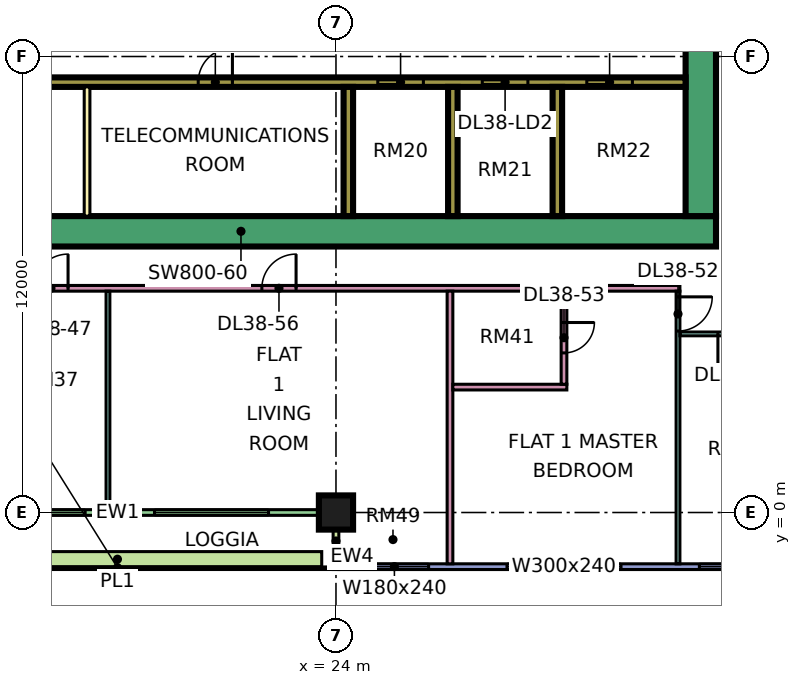
"""IFC4 building model, lengths in metres.
Left out: names, types, materials, properties, quantities, classifications, styles, units other than length and angle.
Written with IfcOpenShell. Run it as: python <this file> out.ifc"""

import sys

from ifc_helpers import new_model, si_unit, direction, frame, frame_2d, origin, origin_2d, place, context, subcontext, project, spatial, rectangle, extrude, element, fill, save


model = new_model("IFC4")
c1 = context("Model", 3, precision=1e-05, world=origin(), true_north=direction((0.0, 1.0)))
c2 = subcontext(c1, "Body", "Model", "MODEL_VIEW")
j1 = project(units=[si_unit("LENGTHUNIT", "METRE"), si_unit("PLANEANGLEUNIT", "RADIAN")], contexts=[c1])
p1 = place(None, origin())
s1 = spatial("IfcSite", under=j1, at=p1, CompositionType="ELEMENT")
p2 = place(p1, origin())
s2 = spatial("IfcBuilding", under=s1, at=p2, CompositionType="ELEMENT")
p3 = place(p2, frame((0.0, 0.0, 168.65)))
s3 = spatial("IfcBuildingStorey", under=s2, at=p3, CompositionType="ELEMENT", Elevation=168.65)
p4 = place(p3, frame((24.0, 0.0, 0.0), z_axis=(0.0, 0.0, 1.0), x_axis=(1.0, 0.0, 0.0)))
e1 = element("IfcColumn", 1, at=p4, inside=s3, PredefinedType="COLUMN", context=c2, shape_type="SweptSolid", body=[
    extrude(rectangle(XDim=0.9, YDim=0.9, at=origin_2d()), origin(), (0.0, 0.0, 1.0), 3.75),
])
p5 = place(p3, frame((9.0, 7.4, 0.0), z_axis=(0.0, 0.0, 1.0), x_axis=(1.0, 0.0, 0.0)))
e2 = element("IfcWall", 2, at=p5, inside=s3, PredefinedType="SHEAR", context=c2, shape_type="SweptSolid", body=[
    extrude(rectangle(XDim=25.0, YDim=0.8, at=frame_2d((12.5, 0.0))), origin(), (0.0, 0.0, 1.0), 3.75),
])
p6 = place(p3, frame((33.6, 7.8, 0.0), z_axis=(0.0, 0.0, 1.0), x_axis=(0.0, 1.0, 0.0)))
e3 = element("IfcWall", 3, at=p6, inside=s3, PredefinedType="SHEAR", context=c2, shape_type="SweptSolid", body=[
    extrude(rectangle(XDim=11.4, YDim=0.8, at=frame_2d((5.7, 0.0))), origin(), (0.0, 0.0, 1.0), 3.75),
])
p7 = place(p6, frame((5.4, 0.0, 0.0)))
e4 = element("IfcOpeningElement", 4, at=p7, cuts=e3, PredefinedType="OPENING", context=c2, shape_type="SweptSolid", body=[
    extrude(rectangle(XDim=1.8, YDim=2.4, at=frame_2d((0.9, 1.2))), frame((0.0, 0.41, 0.0), z_axis=(0.0, -1.0, 0.0), x_axis=(1.0, 0.0, 0.0)), (0.0, 0.0, 1.0), 0.82),
])
p8 = place(p3, frame((13.45, 11.325, 0.0), z_axis=(0.0, 0.0, 1.0), x_axis=(1.0, 0.0, 0.0)))
e5 = element("IfcWall", 5, at=p8, inside=s3, PredefinedType="SHEAR", context=c2, shape_type="SweptSolid", body=[
    extrude(rectangle(XDim=19.75, YDim=0.25, at=frame_2d((9.875, 0.0))), origin(), (0.0, 0.0, 1.0), 3.75),
])
p9 = place(p8, frame((11.65, 0.0, 0.0)))
e6 = element("IfcOpeningElement", 6, at=p9, cuts=e5, PredefinedType="OPENING", context=c2, shape_type="SweptSolid", body=[
    extrude(rectangle(XDim=1.2, YDim=2.2, at=frame_2d((0.6, 1.1))), frame((0.0, 0.135, 0.0), z_axis=(0.0, -1.0, 0.0), x_axis=(1.0, 0.0, 0.0)), (0.0, 0.0, 1.0), 0.27),
])
p10 = place(p8, frame((14.4, 0.0, 0.0)))
e7 = element("IfcOpeningElement", 7, at=p10, cuts=e5, PredefinedType="OPENING", context=c2, shape_type="SweptSolid", body=[
    extrude(rectangle(XDim=1.2, YDim=2.2, at=frame_2d((0.6, 1.1))), frame((0.0, 0.135, 0.0), z_axis=(0.0, -1.0, 0.0), x_axis=(1.0, 0.0, 0.0)), (0.0, 0.0, 1.0), 0.27),
])
p11 = place(p8, frame((17.15, 0.0, 0.0)))
e8 = element("IfcOpeningElement", 8, at=p11, cuts=e5, PredefinedType="OPENING", context=c2, shape_type="SweptSolid", body=[
    extrude(rectangle(XDim=1.2, YDim=2.2, at=frame_2d((0.6, 1.1))), frame((0.0, 0.135, 0.0), z_axis=(0.0, -1.0, 0.0), x_axis=(1.0, 0.0, 0.0)), (0.0, 0.0, 1.0), 0.27),
])
p12 = place(p8, frame((1.55, 0.0, 0.0)))
e9 = element("IfcOpeningElement", 9, at=p12, cuts=e5, PredefinedType="OPENING", context=c2, shape_type="SweptSolid", body=[
    extrude(rectangle(XDim=0.9, YDim=2.1, at=frame_2d((0.45, 1.05))), frame((0.0, 0.135, 0.0), z_axis=(0.0, -1.0, 0.0), x_axis=(1.0, 0.0, 0.0)), (0.0, 0.0, 1.0), 0.27),
])
p13 = place(p8, frame((6.925, 0.0, 0.0)))
e10 = element("IfcOpeningElement", 10, at=p13, cuts=e5, PredefinedType="OPENING", context=c2, shape_type="SweptSolid", body=[
    extrude(rectangle(XDim=0.9, YDim=2.1, at=frame_2d((0.45, 1.05))), frame((0.0, 0.135, 0.0), z_axis=(0.0, -1.0, 0.0), x_axis=(1.0, 0.0, 0.0)), (0.0, 0.0, 1.0), 0.27),
])
for number, where, z_axis, x_axis in (
    (11, (24.325, 7.8, 0.0), (0.0, 0.0, 1.0), (0.0, 1.0, 0.0)),
    (12, (27.075, 7.8, 0.0), (0.0, 0.0, 1.0), (0.0, 1.0, 0.0)),
    (13, (29.825, 7.8, 0.0), (0.0, 0.0, 1.0), (0.0, 1.0, 0.0)),
):
    element("IfcWall", number, at=place(p3, frame(where, z_axis=z_axis, x_axis=x_axis)), inside=s3, PredefinedType="SHEAR", context=c2, shape_type="SweptSolid", body=[
        extrude(rectangle(XDim=3.4, YDim=0.25, at=frame_2d((1.7, 0.0))), origin(), (0.0, 0.0, 1.0), 3.75),
    ])
p14 = place(p3, frame((12.575, 0.0, 0.0), z_axis=(0.0, 0.0, 1.0), x_axis=(1.0, 0.0, 0.0)))
e14 = element("IfcWall", 14, at=p14, inside=s3, PredefinedType="SOLIDWALL", context=c2, shape_type="SweptSolid", body=[
    extrude(rectangle(XDim=11.35, YDim=0.15, at=frame_2d((5.675, 0.0))), origin(), (0.0, 0.0, 1.0), 3.35),
])
p15 = place(p14, frame((0.613, 0.0, 0.0)))
e15 = element("IfcOpeningElement", 15, at=p15, cuts=e14, PredefinedType="OPENING", context=c2, shape_type="SweptSolid", body=[
    extrude(rectangle(XDim=1.2, YDim=2.4, at=frame_2d((0.6, 1.2))), frame((0.0, 0.085, 0.0), z_axis=(0.0, -1.0, 0.0), x_axis=(1.0, 0.0, 0.0)), (0.0, 0.0, 1.0), 0.17),
])
p16 = place(p14, frame((3.025, 0.0, 0.45)))
e16 = element("IfcOpeningElement", 16, at=p16, cuts=e14, PredefinedType="OPENING", context=c2, shape_type="SweptSolid", body=[
    extrude(rectangle(XDim=1.8, YDim=2.4, at=frame_2d((0.9, 1.2))), frame((0.0, 0.085, 0.0), z_axis=(0.0, -1.0, 0.0), x_axis=(1.0, 0.0, 0.0)), (0.0, 0.0, 1.0), 0.17),
])
p17 = place(p14, frame((6.65, 0.0, 0.45)))
e17 = element("IfcOpeningElement", 17, at=p17, cuts=e14, PredefinedType="OPENING", context=c2, shape_type="SweptSolid", body=[
    extrude(rectangle(XDim=3.0, YDim=2.4, at=frame_2d((1.5, 1.2))), frame((0.0, 0.085, 0.0), z_axis=(0.0, -1.0, 0.0), x_axis=(1.0, 0.0, 0.0)), (0.0, 0.0, 1.0), 0.17),
])
p18 = place(p3, frame((24.0, -1.5, 0.0), z_axis=(0.0, 0.0, 1.0), x_axis=(0.0, 1.0, 0.0)))
e18 = element("IfcWall", 18, at=p18, inside=s3, PredefinedType="SOLIDWALL", context=c2, shape_type="SweptSolid", body=[
    extrude(rectangle(XDim=1.5, YDim=0.15, at=frame_2d((0.75, 0.0))), origin(), (0.0, 0.0, 1.0), 3.35),
])
p19 = place(p3, frame((24.075, -1.425, 0.0), z_axis=(0.0, 0.0, 1.0), x_axis=(1.0, 0.0, 0.0)))
e19 = element("IfcWall", 19, at=p19, inside=s3, PredefinedType="SOLIDWALL", context=c2, shape_type="SweptSolid", body=[
    extrude(rectangle(XDim=11.85, YDim=0.15, at=frame_2d((5.925, 0.0))), origin(), (0.0, 0.0, 1.0), 3.35),
])
p20 = place(p19, frame((0.562, 0.0, 0.45)))
e20 = element("IfcOpeningElement", 20, at=p20, cuts=e19, PredefinedType="OPENING", context=c2, shape_type="SweptSolid", body=[
    extrude(rectangle(XDim=1.8, YDim=2.4, at=frame_2d((0.9, 1.2))), frame((0.0, 0.085, 0.0), z_axis=(0.0, -1.0, 0.0), x_axis=(1.0, 0.0, 0.0)), (0.0, 0.0, 1.0), 0.17),
])
p21 = place(p19, frame((4.425, 0.0, 0.45)))
e21 = element("IfcOpeningElement", 21, at=p21, cuts=e19, PredefinedType="OPENING", context=c2, shape_type="SweptSolid", body=[
    extrude(rectangle(XDim=3.0, YDim=2.4, at=frame_2d((1.5, 1.2))), frame((0.0, 0.085, 0.0), z_axis=(0.0, -1.0, 0.0), x_axis=(1.0, 0.0, 0.0)), (0.0, 0.0, 1.0), 0.17),
])
p22 = place(p19, frame((9.488, 0.0, 0.45)))
e22 = element("IfcOpeningElement", 22, at=p22, cuts=e19, PredefinedType="OPENING", context=c2, shape_type="SweptSolid", body=[
    extrude(rectangle(XDim=1.8, YDim=2.4, at=frame_2d((0.9, 1.2))), frame((0.0, 0.085, 0.0), z_axis=(0.0, -1.0, 0.0), x_axis=(1.0, 0.0, 0.0)), (0.0, 0.0, 1.0), 0.17),
])
p23 = place(p3, frame((12.875, -1.229, 0.0), z_axis=(0.0, 0.0, 1.0), x_axis=(1.0, 0.0, 0.0)))
e23 = element("IfcWall", 23, at=p23, inside=s3, PredefinedType="SOLIDWALL", context=c2, shape_type="SweptSolid", body=[
    extrude(rectangle(XDim=10.75, YDim=0.4, at=frame_2d((5.375, 0.0))), origin(), (0.0, 0.0, 1.0), 0.7),
])
p24 = place(p3, frame((17.45, 7.8, 0.0), z_axis=(0.0, 0.0, 1.0), x_axis=(0.0, 1.0, 0.0)))
e24 = element("IfcWall", 24, at=p24, inside=s3, PredefinedType="PARTITIONING", context=c2, shape_type="SweptSolid", body=[
    extrude(rectangle(XDim=3.4, YDim=0.15, at=frame_2d((1.7, 0.0))), origin(), (0.0, 0.0, 1.0), 3.35),
])
p25 = place(p3, frame((11.95, 5.9, 0.0), z_axis=(0.0, 0.0, 1.0), x_axis=(1.0, 0.0, 0.0)))
e25 = element("IfcWall", 25, at=p25, inside=s3, PredefinedType="PARTITIONING", context=c2, shape_type="SweptSolid", body=[
    extrude(rectangle(XDim=21.1, YDim=0.15, at=frame_2d((10.55, 0.0))), origin(), (0.0, 0.0, 1.0), 3.35),
])
p26 = place(p25, frame((1.1, 0.0, 0.0)))
e26 = element("IfcOpeningElement", 26, at=p26, cuts=e25, PredefinedType="OPENING", context=c2, shape_type="SweptSolid", body=[
    extrude(rectangle(XDim=0.9, YDim=2.1, at=frame_2d((0.45, 1.05))), frame((0.0, 0.085, 0.0), z_axis=(0.0, -1.0, 0.0), x_axis=(1.0, 0.0, 0.0)), (0.0, 0.0, 1.0), 0.17),
])
p27 = place(p25, frame((4.1, 0.0, 0.0)))
e27 = element("IfcOpeningElement", 27, at=p27, cuts=e25, PredefinedType="OPENING", context=c2, shape_type="SweptSolid", body=[
    extrude(rectangle(XDim=0.9, YDim=2.1, at=frame_2d((0.45, 1.05))), frame((0.0, 0.085, 0.0), z_axis=(0.0, -1.0, 0.0), x_axis=(1.0, 0.0, 0.0)), (0.0, 0.0, 1.0), 0.17),
])
p28 = place(p25, frame((10.1, 0.0, 0.0)))
e28 = element("IfcOpeningElement", 28, at=p28, cuts=e25, PredefinedType="OPENING", context=c2, shape_type="SweptSolid", body=[
    extrude(rectangle(XDim=0.9, YDim=2.1, at=frame_2d((0.45, 1.05))), frame((0.0, 0.085, 0.0), z_axis=(0.0, -1.0, 0.0), x_axis=(1.0, 0.0, 0.0)), (0.0, 0.0, 1.0), 0.17),
])
p29 = place(p3, frame((18.0, 0.074, 0.0), z_axis=(0.0, 0.0, 1.0), x_axis=(0.0, 1.0, 0.0)))
e29 = element("IfcWall", 29, at=p29, inside=s3, PredefinedType="PARTITIONING", context=c2, shape_type="SweptSolid", body=[
    extrude(rectangle(XDim=5.751, YDim=0.1, at=frame_2d((2.875, 0.0))), origin(), (0.0, 0.0, 1.0), 3.35),
])
p30 = place(p3, frame((27.0, -1.35, 0.0), z_axis=(0.0, 0.0, 1.0), x_axis=(0.0, 1.0, 0.0)))
e30 = element("IfcWall", 30, at=p30, inside=s3, PredefinedType="PARTITIONING", context=c2, shape_type="SweptSolid", body=[
    extrude(rectangle(XDim=7.175, YDim=0.15, at=frame_2d((3.587, 0.0))), origin(), (0.0, 0.0, 1.0), 3.35),
])
p31 = place(p3, frame((27.075, 3.3, 0.0), z_axis=(0.0, 0.0, 1.0), x_axis=(1.0, 0.0, 0.0)))
e31 = element("IfcWall", 31, at=p31, inside=s3, PredefinedType="PARTITIONING", context=c2, shape_type="SweptSolid", body=[
    extrude(rectangle(XDim=3.0, YDim=0.15, at=frame_2d((1.5, 0.0))), origin(), (0.0, 0.0, 1.0), 3.35),
])
p32 = place(p3, frame((30.0, 3.375, 0.0), z_axis=(0.0, 0.0, 1.0), x_axis=(0.0, 1.0, 0.0)))
e32 = element("IfcWall", 32, at=p32, inside=s3, PredefinedType="PARTITIONING", context=c2, shape_type="SweptSolid", body=[
    extrude(rectangle(XDim=2.45, YDim=0.15, at=frame_2d((1.225, 0.0))), origin(), (0.0, 0.0, 1.0), 3.35),
])
p33 = place(p32, frame((0.825, 0.0, 0.0)))
e33 = element("IfcOpeningElement", 33, at=p33, cuts=e32, PredefinedType="OPENING", context=c2, shape_type="SweptSolid", body=[
    extrude(rectangle(XDim=0.8, YDim=2.1, at=frame_2d((0.4, 1.05))), frame((0.0, 0.085, 0.0), z_axis=(0.0, -1.0, 0.0), x_axis=(1.0, 0.0, 0.0)), (0.0, 0.0, 1.0), 0.17),
])
p34 = place(p3, frame((33.0, -1.351, 0.0), z_axis=(0.0, 0.0, 1.0), x_axis=(0.0, 1.0, 0.0)))
e34 = element("IfcWall", 34, at=p34, inside=s3, PredefinedType="PARTITIONING", context=c2, shape_type="SweptSolid", body=[
    extrude(rectangle(XDim=7.176, YDim=0.1, at=frame_2d((3.588, 0.0))), origin(), (0.0, 0.0, 1.0), 3.35),
])
p35 = place(p34, frame((6.126, 0.0, 0.0)))
e35 = element("IfcOpeningElement", 35, at=p35, cuts=e34, PredefinedType="OPENING", context=c2, shape_type="SweptSolid", body=[
    extrude(rectangle(XDim=0.9, YDim=2.1, at=frame_2d((0.45, 1.05))), frame((0.0, 0.06, 0.0), z_axis=(0.0, -1.0, 0.0), x_axis=(1.0, 0.0, 0.0)), (0.0, 0.0, 1.0), 0.12),
])
p36 = place(p3, frame((33.05, 4.7, 0.0), z_axis=(0.0, 0.0, 1.0), x_axis=(1.0, 0.0, 0.0)))
e36 = element("IfcWall", 36, at=p36, inside=s3, PredefinedType="PARTITIONING", context=c2, shape_type="SweptSolid", body=[
    extrude(rectangle(XDim=14.85, YDim=0.1, at=frame_2d((7.425, 0.0))), origin(), (0.0, 0.0, 1.0), 3.35),
])
p37 = place(p36, frame((1.0, 0.0, 0.0)))
e37 = element("IfcOpeningElement", 37, at=p37, cuts=e36, PredefinedType="OPENING", context=c2, shape_type="SweptSolid", body=[
    extrude(rectangle(XDim=0.9, YDim=2.1, at=frame_2d((0.45, 1.05))), frame((0.0, 0.06, 0.0), z_axis=(0.0, -1.0, 0.0), x_axis=(1.0, 0.0, 0.0)), (0.0, 0.0, 1.0), 0.12),
])
p38 = place(p36, frame((13.0, 0.0, 0.0)))
e38 = element("IfcOpeningElement", 38, at=p38, cuts=e36, PredefinedType="OPENING", context=c2, shape_type="SweptSolid", body=[
    extrude(rectangle(XDim=0.9, YDim=2.1, at=frame_2d((0.45, 1.05))), frame((0.0, 0.06, 0.0), z_axis=(0.0, -1.0, 0.0), x_axis=(1.0, 0.0, 0.0)), (0.0, 0.0, 1.0), 0.12),
])
p39 = place(p36, frame((7.0, 0.0, 0.0)))
e39 = element("IfcOpeningElement", 39, at=p39, cuts=e36, PredefinedType="OPENING", context=c2, shape_type="SweptSolid", body=[
    extrude(rectangle(XDim=0.9, YDim=2.1, at=frame_2d((0.45, 1.05))), frame((0.0, 0.06, 0.0), z_axis=(0.0, -1.0, 0.0), x_axis=(1.0, 0.0, 0.0)), (0.0, 0.0, 1.0), 0.12),
])
p40 = place(p16, origin())
e40 = element("IfcWindow", 40, at=p40, inside=s3, PartitioningType="SINGLE_PANEL", PredefinedType="WINDOW", context=c2, shape_type="SweptSolid", body=[
    extrude(rectangle(XDim=1.8, YDim=2.4, at=frame_2d((0.9, 1.2))), frame((0.0, 0.03, 0.0), z_axis=(0.0, -1.0, 0.0), x_axis=(1.0, 0.0, 0.0)), (0.0, 0.0, 1.0), 0.06),
])
fill(e16, e40)
p41 = place(p17, origin())
e41 = element("IfcWindow", 41, at=p41, inside=s3, PartitioningType="SINGLE_PANEL", PredefinedType="WINDOW", context=c2, shape_type="SweptSolid", body=[
    extrude(rectangle(XDim=3.0, YDim=2.4, at=frame_2d((1.5, 1.2))), frame((0.0, 0.03, 0.0), z_axis=(0.0, -1.0, 0.0), x_axis=(1.0, 0.0, 0.0)), (0.0, 0.0, 1.0), 0.06),
])
fill(e17, e41)
p42 = place(p20, origin())
e42 = element("IfcWindow", 42, at=p42, inside=s3, PartitioningType="SINGLE_PANEL", PredefinedType="WINDOW", context=c2, shape_type="SweptSolid", body=[
    extrude(rectangle(XDim=1.8, YDim=2.4, at=frame_2d((0.9, 1.2))), frame((0.0, 0.03, 0.0), z_axis=(0.0, -1.0, 0.0), x_axis=(1.0, 0.0, 0.0)), (0.0, 0.0, 1.0), 0.06),
])
fill(e20, e42)
p43 = place(p21, origin())
e43 = element("IfcWindow", 43, at=p43, inside=s3, PartitioningType="SINGLE_PANEL", PredefinedType="WINDOW", context=c2, shape_type="SweptSolid", body=[
    extrude(rectangle(XDim=3.0, YDim=2.4, at=frame_2d((1.5, 1.2))), frame((0.0, 0.03, 0.0), z_axis=(0.0, -1.0, 0.0), x_axis=(1.0, 0.0, 0.0)), (0.0, 0.0, 1.0), 0.06),
])
fill(e21, e43)
p44 = place(p22, origin())
e44 = element("IfcWindow", 44, at=p44, inside=s3, PartitioningType="SINGLE_PANEL", PredefinedType="WINDOW", context=c2, shape_type="SweptSolid", body=[
    extrude(rectangle(XDim=1.8, YDim=2.4, at=frame_2d((0.9, 1.2))), frame((0.0, 0.03, 0.0), z_axis=(0.0, -1.0, 0.0), x_axis=(1.0, 0.0, 0.0)), (0.0, 0.0, 1.0), 0.06),
])
fill(e22, e44)
p45 = place(p9, origin())
e45 = element("IfcDoor", 45, at=p45, inside=s3, OperationType="DOUBLE_DOOR_SLIDING", PredefinedType="DOOR", context=c2, shape_type="SweptSolid", body=[
    extrude(rectangle(XDim=1.2, YDim=2.2, at=frame_2d((0.6, 1.1))), frame((0.0, 0.025, 0.0), z_axis=(0.0, -1.0, 0.0), x_axis=(1.0, 0.0, 0.0)), (0.0, 0.0, 1.0), 0.05),
])
fill(e6, e45)
p46 = place(p10, origin())
e46 = element("IfcDoor", 46, at=p46, inside=s3, OperationType="DOUBLE_DOOR_SLIDING", PredefinedType="DOOR", context=c2, shape_type="SweptSolid", body=[
    extrude(rectangle(XDim=1.2, YDim=2.2, at=frame_2d((0.6, 1.1))), frame((0.0, 0.025, 0.0), z_axis=(0.0, -1.0, 0.0), x_axis=(1.0, 0.0, 0.0)), (0.0, 0.0, 1.0), 0.05),
])
fill(e7, e46)
p47 = place(p11, origin())
e47 = element("IfcDoor", 47, at=p47, inside=s3, OperationType="DOUBLE_DOOR_SLIDING", PredefinedType="DOOR", context=c2, shape_type="SweptSolid", body=[
    extrude(rectangle(XDim=1.2, YDim=2.2, at=frame_2d((0.6, 1.1))), frame((0.0, 0.025, 0.0), z_axis=(0.0, -1.0, 0.0), x_axis=(1.0, 0.0, 0.0)), (0.0, 0.0, 1.0), 0.05),
])
fill(e8, e47)
p48 = place(p13, frame((0.9, 0.0, 0.0), z_axis=(0.0, 0.0, 1.0), x_axis=(-1.0, 0.0, 0.0)))
e48 = element("IfcDoor", 48, at=p48, inside=s3, OperationType="SINGLE_SWING_RIGHT", PredefinedType="DOOR", context=c2, shape_type="SweptSolid", body=[
    extrude(rectangle(XDim=0.9, YDim=2.1, at=frame_2d((0.45, 1.05))), frame((0.0, 0.025, 0.0), z_axis=(0.0, -1.0, 0.0), x_axis=(1.0, 0.0, 0.0)), (0.0, 0.0, 1.0), 0.05),
])
fill(e10, e48)
p49 = place(p27, frame((0.9, 0.0, 0.0), z_axis=(0.0, 0.0, 1.0), x_axis=(-1.0, 0.0, 0.0)))
e49 = element("IfcDoor", 49, at=p49, inside=s3, OperationType="SINGLE_SWING_RIGHT", PredefinedType="DOOR", context=c2, shape_type="SweptSolid", body=[
    extrude(rectangle(XDim=0.9, YDim=2.1, at=frame_2d((0.45, 1.05))), frame((0.0, 0.025, 0.0), z_axis=(0.0, -1.0, 0.0), x_axis=(1.0, 0.0, 0.0)), (0.0, 0.0, 1.0), 0.05),
])
fill(e27, e49)
p50 = place(p37, frame((0.9, 0.0, 0.0), z_axis=(0.0, 0.0, 1.0), x_axis=(-1.0, 0.0, 0.0)))
e50 = element("IfcDoor", 50, at=p50, inside=s3, OperationType="SINGLE_SWING_LEFT", PredefinedType="DOOR", context=c2, shape_type="SweptSolid", body=[
    extrude(rectangle(XDim=0.9, YDim=2.1, at=frame_2d((0.45, 1.05))), frame((0.0, 0.025, 0.0), z_axis=(0.0, -1.0, 0.0), x_axis=(1.0, 0.0, 0.0)), (0.0, 0.0, 1.0), 0.05),
])
fill(e37, e50)
p51 = place(p35, origin())
e51 = element("IfcDoor", 51, at=p51, inside=s3, OperationType="SINGLE_SWING_RIGHT", PredefinedType="DOOR", context=c2, shape_type="SweptSolid", body=[
    extrude(rectangle(XDim=0.9, YDim=2.1, at=frame_2d((0.45, 1.05))), frame((0.0, 0.025, 0.0), z_axis=(0.0, -1.0, 0.0), x_axis=(1.0, 0.0, 0.0)), (0.0, 0.0, 1.0), 0.05),
])
fill(e35, e51)
p52 = place(p33, origin())
e52 = element("IfcDoor", 52, at=p52, inside=s3, OperationType="SINGLE_SWING_RIGHT", PredefinedType="DOOR", context=c2, shape_type="SweptSolid", body=[
    extrude(rectangle(XDim=0.8, YDim=2.1, at=frame_2d((0.4, 1.05))), frame((0.0, 0.025, 0.0), z_axis=(0.0, -1.0, 0.0), x_axis=(1.0, 0.0, 0.0)), (0.0, 0.0, 1.0), 0.05),
])
fill(e33, e52)
p53 = place(p28, frame((0.9, 0.0, 0.0), z_axis=(0.0, 0.0, 1.0), x_axis=(-1.0, 0.0, 0.0)))
e53 = element("IfcDoor", 53, at=p53, inside=s3, OperationType="SINGLE_SWING_RIGHT", PredefinedType="DOOR", context=c2, shape_type="SweptSolid", body=[
    extrude(rectangle(XDim=0.9, YDim=2.1, at=frame_2d((0.45, 1.05))), frame((0.0, 0.025, 0.0), z_axis=(0.0, -1.0, 0.0), x_axis=(1.0, 0.0, 0.0)), (0.0, 0.0, 1.0), 0.05),
])
fill(e28, e53)
save(model, sys.argv[1])
